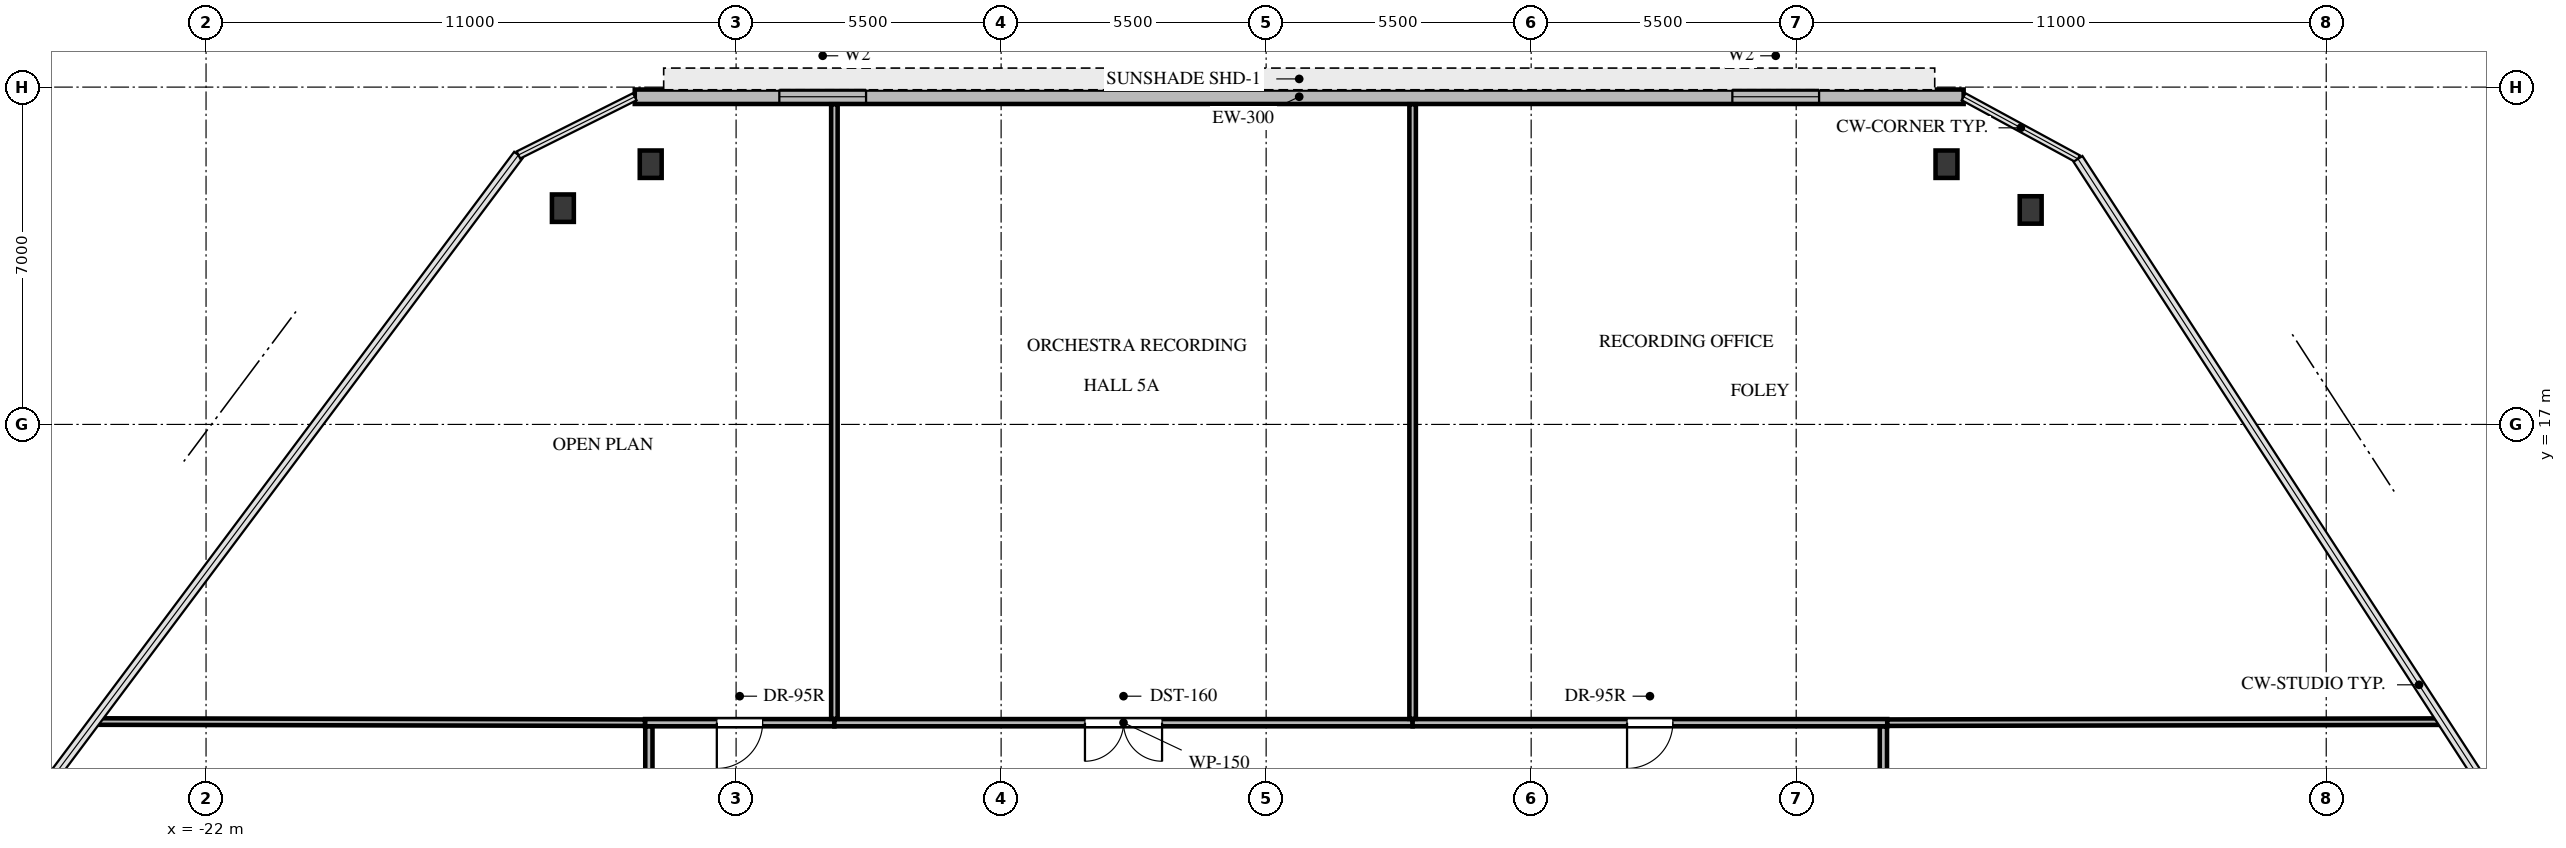
"""IFC4 building model, lengths in metres.
Left out: names, types, materials, properties, quantities, classifications, styles, units other than length and angle.
Written with IfcOpenShell. Run it as: python <this file> out.ifc"""

import sys

from ifc_helpers import new_model, si_unit, direction, frame, frame_2d, origin, origin_2d, place, context, subcontext, project, spatial, rectangle, i_section, extrude, source, transform, mapped, element, fill, save


model = new_model("IFC4")
c1 = context("Model", 3, precision=1e-05, world=origin(), true_north=direction((0.0, 1.0)))
c2 = subcontext(c1, "Body", "Model", "MODEL_VIEW")
j1 = project(units=[si_unit("LENGTHUNIT", "METRE"), si_unit("PLANEANGLEUNIT", "RADIAN")], contexts=[c1])
p1 = place(None, origin())
s1 = spatial("IfcSite", under=j1, at=p1, CompositionType="ELEMENT")
p2 = place(p1, origin())
s2 = spatial("IfcBuilding", under=s1, at=p2, CompositionType="ELEMENT")
p3 = place(p2, frame((0.0, 0.0, 26.8)))
s3 = spatial("IfcBuildingStorey", under=s2, at=p3, CompositionType="ELEMENT", Elevation=26.8)
m1 = source(origin(), c2, "Body", "SweptSolid", [
    extrude(i_section(OverallWidth=0.454, OverallDepth=0.569, WebThickness=0.078, FlangeThickness=0.125, FilletRadius=0.031, at=origin_2d()), origin(), (0.0, 0.0, 1.0), 5.68),
])
for number, where, z_axis, x_axis in (
    (1, (-14.594, 21.488, -0.32), (0.0, 0.0, 1.0), (1.0, 0.0, 0.0)),
    (2, (-12.772, 22.4, -0.32), (0.0, 0.0, 1.0), (1.0, 0.0, 0.0)),
    (3, (14.119, 22.4, -0.32), (0.0, 0.0, 1.0), (1.0, 0.0, 0.0)),
    (4, (15.866, 21.451, -0.32), (0.0, 0.0, 1.0), (1.0, 0.0, 0.0)),
):
    element("IfcColumn", number, at=place(p3, frame(where, z_axis=z_axis, x_axis=x_axis)), inside=s3, PredefinedType="COLUMN", context=c2, shape_type="MappedRepresentation", body=[
        mapped(m1, transform((0.0, 0.0, 0.0), x_axis=(1.0, 0.0, 0.0), y_axis=(0.0, 1.0, 0.0), z_axis=(0.0, 0.0, 1.0), scale=1.0)),
    ])
p4 = place(p3, frame((-13.103, 23.8, 0.0), z_axis=(0.0, 0.0, 1.0), x_axis=(1.0, 0.0, 0.0)))
e5 = element("IfcWall", 5, at=p4, inside=s3, PredefinedType="SOLIDWALL", context=c2, shape_type="SweptSolid", body=[
    extrude(rectangle(XDim=27.578, YDim=0.3, at=frame_2d((13.789, 0.0))), origin(), (0.0, 0.0, 1.0), 5.36),
])
p5 = place(p4, frame((3.0, 0.0, 1.0)))
e6 = element("IfcOpeningElement", 6, at=p5, cuts=e5, PredefinedType="OPENING", context=c2, shape_type="SweptSolid", body=[
    extrude(rectangle(XDim=1.8, YDim=2.1, at=frame_2d((0.9, 1.05))), frame((0.0, 0.16, 0.0), z_axis=(0.0, -1.0, 0.0), x_axis=(1.0, 0.0, 0.0)), (0.0, 0.0, 1.0), 0.32),
])
p6 = place(p4, frame((22.778, 0.0, 1.0)))
e7 = element("IfcOpeningElement", 7, at=p6, cuts=e5, PredefinedType="OPENING", context=c2, shape_type="SweptSolid", body=[
    extrude(rectangle(XDim=1.8, YDim=2.1, at=frame_2d((0.9, 1.05))), frame((0.0, 0.16, 0.0), z_axis=(0.0, -1.0, 0.0), x_axis=(1.0, 0.0, 0.0)), (0.0, 0.0, 1.0), 0.32),
])
p7 = place(p3, frame((-8.96, 10.81, 0.0), z_axis=(0.0, 0.0, 1.0), x_axis=(-1.0, 0.0, 0.0)))
e8 = element("IfcWall", 8, at=p7, inside=s3, PredefinedType="PARTITIONING", context=c2, shape_type="SweptSolid", body=[
    extrude(rectangle(XDim=3.93, YDim=0.15, at=frame_2d((1.965, 0.0))), origin(), (0.0, 0.0, 1.0), 3.53),
])
p8 = place(p7, frame((1.49, 0.0, 0.0)))
e9 = element("IfcOpeningElement", 9, at=p8, cuts=e8, PredefinedType="OPENING", context=c2, shape_type="SweptSolid", body=[
    extrude(rectangle(XDim=0.95, YDim=2.1, at=frame_2d((0.475, 1.05))), frame((0.0, 0.085, 0.0), z_axis=(0.0, -1.0, 0.0), x_axis=(1.0, 0.0, 0.0)), (0.0, 0.0, 1.0), 0.17),
])
p9 = place(p3, frame((3.04, 10.81, 0.0), z_axis=(0.0, 0.0, 1.0), x_axis=(-1.0, 0.0, 0.0)))
e10 = element("IfcWall", 10, at=p9, inside=s3, PredefinedType="PARTITIONING", context=c2, shape_type="SweptSolid", body=[
    extrude(rectangle(XDim=12.0, YDim=0.15, at=frame_2d((6.0, 0.0))), origin(), (0.0, 0.0, 1.0), 4.693),
])
p10 = place(p9, frame((5.2, 0.0, 0.0)))
e11 = element("IfcOpeningElement", 11, at=p10, cuts=e10, PredefinedType="OPENING", context=c2, shape_type="SweptSolid", body=[
    extrude(rectangle(XDim=1.6, YDim=2.15, at=frame_2d((0.8, 1.075))), frame((0.0, 0.085, 0.0), z_axis=(0.0, -1.0, 0.0), x_axis=(1.0, 0.0, 0.0)), (0.0, 0.0, 1.0), 0.17),
])
p11 = place(p3, frame((12.89, 10.81, 0.0), z_axis=(0.0, 0.0, 1.0), x_axis=(-1.0, 0.0, 0.0)))
e12 = element("IfcWall", 12, at=p11, inside=s3, PredefinedType="PARTITIONING", context=c2, shape_type="SweptSolid", body=[
    extrude(rectangle(XDim=9.85, YDim=0.15, at=frame_2d((4.925, 0.0))), origin(), (0.0, 0.0, 1.0), 3.53),
])
p12 = place(p11, frame((4.45, 0.0, 0.0)))
e13 = element("IfcOpeningElement", 13, at=p12, cuts=e12, PredefinedType="OPENING", context=c2, shape_type="SweptSolid", body=[
    extrude(rectangle(XDim=0.95, YDim=2.1, at=frame_2d((0.475, 1.05))), frame((0.0, 0.085, 0.0), z_axis=(0.0, -1.0, 0.0), x_axis=(1.0, 0.0, 0.0)), (0.0, 0.0, 1.0), 0.17),
])
p13 = place(p3, frame((-12.81, 10.731, 0.0), z_axis=(0.0, 0.0, 1.0), x_axis=(0.0, -1.0, 0.0)))
e14 = element("IfcWall", 14, at=p13, inside=s3, PredefinedType="PARTITIONING", context=c2, shape_type="SweptSolid", body=[
    extrude(rectangle(XDim=8.191, YDim=0.15, at=frame_2d((4.095, 0.0))), origin(), (0.0, 0.0, 1.0), 3.53),
])
p14 = place(p13, frame((3.621, 0.0, 0.0)))
e15 = element("IfcOpeningElement", 15, at=p14, cuts=e14, PredefinedType="OPENING", context=c2, shape_type="SweptSolid", body=[
    extrude(rectangle(XDim=0.95, YDim=2.1, at=frame_2d((0.475, 1.05))), frame((0.0, 0.085, 0.0), z_axis=(0.0, -1.0, 0.0), x_axis=(1.0, 0.0, 0.0)), (0.0, 0.0, 1.0), 0.17),
])
p15 = place(p3, frame((12.81, 4.04, 0.0), z_axis=(0.0, 0.0, 1.0), x_axis=(0.0, 1.0, 0.0)))
e16 = element("IfcWall", 16, at=p15, inside=s3, PredefinedType="PARTITIONING", context=c2, shape_type="SweptSolid", body=[
    extrude(rectangle(XDim=6.691, YDim=0.15, at=frame_2d((3.345, 0.0))), origin(), (0.0, 0.0, 1.0), 5.345),
])
p16 = place(p15, frame((0.35, 0.0, 0.0)))
e17 = element("IfcOpeningElement", 17, at=p16, cuts=e16, PredefinedType="OPENING", context=c2, shape_type="SweptSolid", body=[
    extrude(rectangle(XDim=1.6, YDim=2.15, at=frame_2d((0.8, 1.075))), frame((0.0, 0.085, 0.0), z_axis=(0.0, -1.0, 0.0), x_axis=(1.0, 0.0, 0.0)), (0.0, 0.0, 1.0), 0.17),
])
p17 = place(p3, frame((-8.96, 23.645, 0.0), z_axis=(0.0, 0.0, 1.0), x_axis=(0.0, -1.0, 0.0)))
e18 = element("IfcWall", 18, at=p17, inside=s3, PredefinedType="PARTITIONING", context=c2, shape_type="SweptSolid", body=[
    extrude(rectangle(XDim=12.756, YDim=0.135, at=frame_2d((6.378, 0.0))), origin(), (0.0, 0.0, 1.0), 3.53),
])
p18 = place(p3, frame((-12.89, 10.81, 0.0), z_axis=(0.0, 0.0, 1.0), x_axis=(-0.999997852069, 0.002072645121, 0.0)))
e19 = element("IfcWall", 19, at=p18, inside=s3, PredefinedType="PARTITIONING", context=c2, shape_type="SweptSolid", body=[
    extrude(rectangle(XDim=11.426, YDim=0.135, at=frame_2d((5.713, 0.0))), origin(), (0.0, 0.0, 1.0), 3.53),
])
p19 = place(p3, frame((3.04, 23.645, 0.0), z_axis=(0.0, 0.0, 1.0), x_axis=(0.0, -1.0, 0.0)))
e20 = element("IfcWall", 20, at=p19, inside=s3, PredefinedType="PARTITIONING", context=c2, shape_type="SweptSolid", body=[
    extrude(rectangle(XDim=12.756, YDim=0.135, at=frame_2d((6.378, 0.0))), origin(), (0.0, 0.0, 1.0), 3.53),
])
p20 = place(p3, frame((24.422, 10.832, 0.0), z_axis=(0.0, 0.0, 1.0), x_axis=(-0.999998264499, -0.001863061508, 0.0)))
e21 = element("IfcWall", 21, at=p20, inside=s3, PredefinedType="PARTITIONING", context=c2, shape_type="SweptSolid", body=[
    extrude(rectangle(XDim=11.532, YDim=0.135, at=frame_2d((5.766, 0.0))), origin(), (0.0, 0.0, 1.0), 3.53),
])
m2 = source(origin(), c2, "Body", "SweptSolid", [
    extrude(rectangle(XDim=1.8, YDim=2.1, at=frame_2d((0.9, 1.05))), frame((0.0, 0.03, 0.0), z_axis=(0.0, -1.0, 0.0), x_axis=(1.0, 0.0, 0.0)), (0.0, 0.0, 1.0), 0.06),
])
p21 = place(p5, origin())
e22 = element("IfcWindow", 22, at=p21, inside=s3, PartitioningType="DOUBLE_PANEL_VERTICAL", PredefinedType="WINDOW", context=c2, shape_type="MappedRepresentation", body=[
    mapped(m2, transform((0.0, 0.0, 0.0), x_axis=(1.0, 0.0, 0.0), y_axis=(0.0, 1.0, 0.0), z_axis=(0.0, 0.0, 1.0), scale=1.0)),
])
fill(e6, e22)
p22 = place(p6, origin())
e23 = element("IfcWindow", 23, at=p22, inside=s3, PartitioningType="DOUBLE_PANEL_VERTICAL", PredefinedType="WINDOW", context=c2, shape_type="MappedRepresentation", body=[
    mapped(m2, transform((0.0, 0.0, 0.0), x_axis=(1.0, 0.0, 0.0), y_axis=(0.0, 1.0, 0.0), z_axis=(0.0, 0.0, 1.0), scale=1.0)),
])
fill(e7, e23)
m3 = source(origin(), c2, "Body", "SweptSolid", [
    extrude(rectangle(XDim=0.95, YDim=2.1, at=frame_2d((0.475, 1.05))), frame((0.0, 0.025, 0.0), z_axis=(0.0, -1.0, 0.0), x_axis=(1.0, 0.0, 0.0)), (0.0, 0.0, 1.0), 0.05),
])
p23 = place(p8, origin())
e24 = element("IfcDoor", 24, at=p23, inside=s3, OperationType="SINGLE_SWING_RIGHT", PredefinedType="DOOR", context=c2, shape_type="MappedRepresentation", body=[
    mapped(m3, transform((0.0, 0.0, 0.0), x_axis=(1.0, 0.0, 0.0), y_axis=(0.0, 1.0, 0.0), z_axis=(0.0, 0.0, 1.0), scale=1.0)),
])
fill(e9, e24)
m4 = source(origin(), c2, "Body", "SweptSolid", [
    extrude(rectangle(XDim=1.6, YDim=2.15, at=frame_2d((0.8, 1.075))), frame((0.0, 0.025, 0.0), z_axis=(0.0, -1.0, 0.0), x_axis=(1.0, 0.0, 0.0)), (0.0, 0.0, 1.0), 0.05),
])
p24 = place(p10, origin())
e25 = element("IfcDoor", 25, at=p24, inside=s3, OperationType="DOUBLE_DOOR_SINGLE_SWING", PredefinedType="DOOR", context=c2, shape_type="MappedRepresentation", body=[
    mapped(m4, transform((0.0, 0.0, 0.0), x_axis=(1.0, 0.0, 0.0), y_axis=(0.0, 1.0, 0.0), z_axis=(0.0, 0.0, 1.0), scale=1.0)),
])
fill(e11, e25)
p25 = place(p12, origin())
e26 = element("IfcDoor", 26, at=p25, inside=s3, OperationType="SINGLE_SWING_RIGHT", PredefinedType="DOOR", context=c2, shape_type="MappedRepresentation", body=[
    mapped(m3, transform((0.0, 0.0, 0.0), x_axis=(1.0, 0.0, 0.0), y_axis=(0.0, 1.0, 0.0), z_axis=(0.0, 0.0, 1.0), scale=1.0)),
])
fill(e13, e26)
save(model, sys.argv[1])
